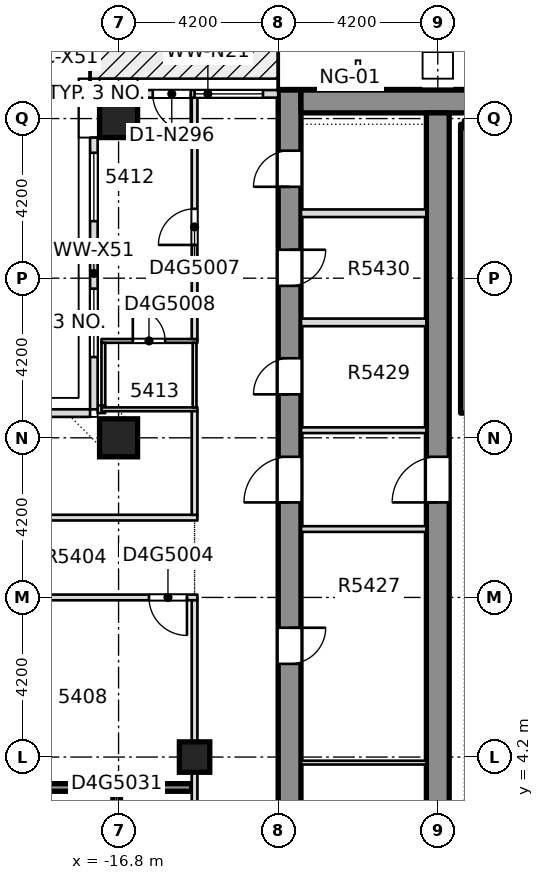
"""IFC4 building model, lengths in metres.
Left out: names, types, materials, properties, quantities, classifications, styles, units other than length and angle.
Written with IfcOpenShell. Run it as: python <this file> out.ifc"""

import sys

from ifc_helpers import new_model, si_unit, direction, frame, frame_2d, origin, origin_2d, place, context, subcontext, project, spatial, rectangle, extrude, element, fill, save


model = new_model("IFC4")
c1 = context("Model", 3, precision=1e-05, world=origin(), true_north=direction((0.0, 1.0)))
c2 = subcontext(c1, "Body", "Model", "MODEL_VIEW")
j1 = project(units=[si_unit("LENGTHUNIT", "METRE"), si_unit("PLANEANGLEUNIT", "RADIAN")], contexts=[c1])
p1 = place(None, origin())
s1 = spatial("IfcSite", under=j1, at=p1, CompositionType="ELEMENT")
p2 = place(p1, origin())
s2 = spatial("IfcBuilding", under=s1, at=p2, CompositionType="ELEMENT")
p3 = place(p2, frame((0.0, 0.0, 206.6)))
s3 = spatial("IfcBuildingStorey", under=s2, at=p3, CompositionType="ELEMENT", Elevation=206.6)
p4 = place(p3, frame((-12.3, -8.4, -0.4), z_axis=(0.0, 0.0, 1.0), x_axis=(0.0, 1.0, 0.0)))
e1 = element("IfcWall", 1, at=p4, inside=s3, PredefinedType="SHEAR", context=c2, shape_type="SweptSolid", body=[
    extrude(rectangle(XDim=30.15, YDim=0.6, at=frame_2d((15.075, 0.0))), origin(), (0.0, 0.0, 1.0), 3.45),
])
p5 = place(p4, frame((4.113, 0.0, 0.4)))
e2 = element("IfcOpeningElement", 2, at=p5, cuts=e1, PredefinedType="OPENING", context=c2, shape_type="SweptSolid", body=[
    extrude(rectangle(XDim=0.95, YDim=2.1, at=frame_2d((0.475, 1.05))), frame((0.0, 0.31, 0.0), z_axis=(0.0, -1.0, 0.0), x_axis=(1.0, 0.0, 0.0)), (0.0, 0.0, 1.0), 0.62),
])
p6 = place(p4, frame((9.89, 0.0, 0.4)))
e3 = element("IfcOpeningElement", 3, at=p6, cuts=e1, PredefinedType="OPENING", context=c2, shape_type="SweptSolid", body=[
    extrude(rectangle(XDim=0.95, YDim=2.1, at=frame_2d((0.475, 1.05))), frame((0.0, 0.31, 0.0), z_axis=(0.0, -1.0, 0.0), x_axis=(1.0, 0.0, 0.0)), (0.0, 0.0, 1.0), 0.62),
])
p7 = place(p4, frame((15.052, 0.0, 0.4)))
e4 = element("IfcOpeningElement", 4, at=p7, cuts=e1, PredefinedType="OPENING", context=c2, shape_type="SweptSolid", body=[
    extrude(rectangle(XDim=0.95, YDim=2.1, at=frame_2d((0.475, 1.05))), frame((0.0, 0.31, 0.0), z_axis=(0.0, -1.0, 0.0), x_axis=(1.0, 0.0, 0.0)), (0.0, 0.0, 1.0), 0.62),
])
p8 = place(p4, frame((22.144, 0.0, 0.4)))
e5 = element("IfcOpeningElement", 5, at=p8, cuts=e1, PredefinedType="OPENING", context=c2, shape_type="SweptSolid", body=[
    extrude(rectangle(XDim=0.95, YDim=2.1, at=frame_2d((0.475, 1.05))), frame((0.0, 0.31, 0.0), z_axis=(0.0, -1.0, 0.0), x_axis=(1.0, 0.0, 0.0)), (0.0, 0.0, 1.0), 0.62),
])
p9 = place(p4, frame((24.998, 0.0, 0.4)))
e6 = element("IfcOpeningElement", 6, at=p9, cuts=e1, PredefinedType="OPENING", context=c2, shape_type="SweptSolid", body=[
    extrude(rectangle(XDim=0.95, YDim=2.1, at=frame_2d((0.475, 1.05))), frame((0.0, 0.31, 0.0), z_axis=(0.0, -1.0, 0.0), x_axis=(1.0, 0.0, 0.0)), (0.0, 0.0, 1.0), 0.62),
])
p10 = place(p4, frame((27.605, 0.0, 0.4)))
e7 = element("IfcOpeningElement", 7, at=p10, cuts=e1, PredefinedType="OPENING", context=c2, shape_type="SweptSolid", body=[
    extrude(rectangle(XDim=0.95, YDim=2.1, at=frame_2d((0.475, 1.05))), frame((0.0, 0.31, 0.0), z_axis=(0.0, -1.0, 0.0), x_axis=(1.0, 0.0, 0.0)), (0.0, 0.0, 1.0), 0.62),
])
p11 = place(p4, frame((19.3, 0.0, 0.4)))
e8 = element("IfcOpeningElement", 8, at=p11, cuts=e1, PredefinedType="OPENING", context=c2, shape_type="SweptSolid", body=[
    extrude(rectangle(XDim=1.2, YDim=2.1, at=frame_2d((0.6, 1.05))), frame((0.0, 0.31, 0.0), z_axis=(0.0, -1.0, 0.0), x_axis=(1.0, 0.0, 0.0)), (0.0, 0.0, 1.0), 0.62),
])
p12 = place(p3, frame((-12.0, 21.45, -0.4), z_axis=(0.0, 0.0, 1.0), x_axis=(1.0, 0.0, 0.0)))
e9 = element("IfcWall", 9, at=p12, inside=s3, PredefinedType="SHEAR", context=c2, shape_type="SweptSolid", body=[
    extrude(rectangle(XDim=24.0, YDim=0.6, at=frame_2d((12.0, 0.0))), origin(), (0.0, 0.0, 1.0), 3.45),
])
p13 = place(p3, frame((-8.4, -7.8, -0.4), z_axis=(0.0, 0.0, 1.0), x_axis=(0.0, 1.0, 0.0)))
e10 = element("IfcWall", 10, at=p13, inside=s3, PredefinedType="SHEAR", context=c2, shape_type="SweptSolid", body=[
    extrude(rectangle(XDim=28.95, YDim=0.6, at=frame_2d((14.475, 0.0))), origin(), (0.0, 0.0, 1.0), 3.45),
])
p14 = place(p13, frame((18.7, 0.0, 0.4)))
e11 = element("IfcOpeningElement", 11, at=p14, cuts=e10, PredefinedType="OPENING", context=c2, shape_type="SweptSolid", body=[
    extrude(rectangle(XDim=1.2, YDim=2.1, at=frame_2d((0.6, 1.05))), frame((0.0, 0.31, 0.0), z_axis=(0.0, -1.0, 0.0), x_axis=(1.0, 0.0, 0.0)), (0.0, 0.0, 1.0), 0.62),
])
for number, where, z_axis, x_axis in (
    (12, (-16.8, 12.6, -0.4), (0.0, 0.0, 1.0), (1.0, 0.0, 0.0)),
    (13, (-16.8, 21.0, -0.4), (0.0, 0.0, 1.0), (1.0, 0.0, 0.0)),
):
    element("IfcColumn", number, at=place(p3, frame(where, z_axis=z_axis, x_axis=x_axis)), inside=s3, PredefinedType="COLUMN", context=c2, shape_type="SweptSolid", body=[
        extrude(rectangle(XDim=1.0, YDim=1.0, at=origin_2d()), origin(), (0.0, 0.0, 1.0), 3.45),
    ])
p15 = place(p3, frame((-14.8, 4.2, -0.4), z_axis=(0.0, 0.0, 1.0), x_axis=(1.0, 0.0, 0.0)))
e14 = element("IfcColumn", 14, at=p15, inside=s3, PredefinedType="COLUMN", context=c2, shape_type="SweptSolid", body=[
    extrude(rectangle(XDim=0.8, YDim=0.8, at=origin_2d()), origin(), (0.0, 0.0, 1.0), 3.45),
])
p16 = place(p3, frame((-20.45, 3.4, 0.0), z_axis=(0.0, 0.0, 1.0), x_axis=(1.0, 0.0, 0.0)))
e15 = element("IfcWall", 15, at=p16, inside=s3, PredefinedType="SOLIDWALL", context=c2, shape_type="SweptSolid", body=[
    extrude(rectangle(XDim=5.575, YDim=0.2, at=frame_2d((2.788, 0.0))), origin(), (0.0, 0.0, 1.0), 3.05),
])
p17 = place(p3, frame((-25.75, 8.4, 0.0), z_axis=(0.0, 0.0, 1.0), x_axis=(1.0, 0.0, 0.0)))
e16 = element("IfcWall", 16, at=p17, inside=s3, PredefinedType="PARTITIONING", context=c2, shape_type="SweptSolid", body=[
    extrude(rectangle(XDim=11.025, YDim=0.15, at=frame_2d((5.512, 0.0))), origin(), (0.0, 0.0, 1.0), 3.05),
])
p18 = place(p17, frame((9.75, 0.0, 0.0)))
e17 = element("IfcOpeningElement", 17, at=p18, cuts=e16, PredefinedType="OPENING", context=c2, shape_type="SweptSolid", body=[
    extrude(rectangle(XDim=1.0, YDim=2.1, at=frame_2d((0.5, 1.05))), frame((0.0, 0.085, 0.0), z_axis=(0.0, -1.0, 0.0), x_axis=(1.0, 0.0, 0.0)), (0.0, 0.0, 1.0), 0.17),
])
p19 = place(p3, frame((-25.75, 10.5, 0.0), z_axis=(0.0, 0.0, 1.0), x_axis=(1.0, 0.0, 0.0)))
e18 = element("IfcWall", 18, at=p19, inside=s3, PredefinedType="PARTITIONING", context=c2, shape_type="SweptSolid", body=[
    extrude(rectangle(XDim=11.025, YDim=0.15, at=frame_2d((5.512, 0.0))), origin(), (0.0, 0.0, 1.0), 3.05),
])
p20 = place(p19, frame((4.875, 0.0, 0.0)))
e19 = element("IfcOpeningElement", 19, at=p20, cuts=e18, PredefinedType="OPENING", context=c2, shape_type="SweptSolid", body=[
    extrude(rectangle(XDim=1.0, YDim=2.1, at=frame_2d((0.5, 1.05))), frame((0.0, 0.085, 0.0), z_axis=(0.0, -1.0, 0.0), x_axis=(1.0, 0.0, 0.0)), (0.0, 0.0, 1.0), 0.17),
])
p21 = place(p3, frame((-17.35, 13.35, 0.0), z_axis=(0.0, 0.0, 1.0), x_axis=(1.0, 0.0, 0.0)))
e20 = element("IfcWall", 20, at=p21, inside=s3, PredefinedType="PARTITIONING", context=c2, shape_type="SweptSolid", body=[
    extrude(rectangle(XDim=0.2, YDim=0.2, at=frame_2d((0.1, 0.0))), origin(), (0.0, 0.0, 1.0), 3.05),
])
p22 = place(p3, frame((-17.25, 13.35, 0.0), z_axis=(0.0, 0.0, 1.0), x_axis=(1.0, 0.0, 0.0)))
e21 = element("IfcWall", 21, at=p22, inside=s3, PredefinedType="PARTITIONING", context=c2, shape_type="SweptSolid", body=[
    extrude(rectangle(XDim=2.525, YDim=0.1, at=frame_2d((1.262, 0.0))), origin(), (0.0, 0.0, 1.0), 3.05),
])
p23 = place(p3, frame((-17.25, 15.15, 0.0), z_axis=(0.0, 0.0, 1.0), x_axis=(1.0, 0.0, 0.0)))
e22 = element("IfcWall", 22, at=p23, inside=s3, PredefinedType="PARTITIONING", context=c2, shape_type="SweptSolid", body=[
    extrude(rectangle(XDim=2.525, YDim=0.1, at=frame_2d((1.262, 0.0))), origin(), (0.0, 0.0, 1.0), 3.05),
])
p24 = place(p23, frame((0.825, 0.0, 0.0)))
e23 = element("IfcOpeningElement", 23, at=p24, cuts=e22, PredefinedType="OPENING", context=c2, shape_type="SweptSolid", body=[
    extrude(rectangle(XDim=0.85, YDim=2.1, at=frame_2d((0.425, 1.05))), frame((0.0, 0.06, 0.0), z_axis=(0.0, -1.0, 0.0), x_axis=(1.0, 0.0, 0.0)), (0.0, 0.0, 1.0), 0.12),
])
p25 = place(p3, frame((-17.2, 13.45, 0.0), z_axis=(0.0, 0.0, 1.0), x_axis=(0.0, 1.0, 0.0)))
e24 = element("IfcWall", 24, at=p25, inside=s3, PredefinedType="PARTITIONING", context=c2, shape_type="SweptSolid", body=[
    extrude(rectangle(XDim=1.65, YDim=0.1, at=frame_2d((0.825, 0.0))), origin(), (0.0, 0.0, 1.0), 3.05),
])
p26 = place(p3, frame((-16.85, -3.3, 0.0), z_axis=(0.0, 0.0, 1.0), x_axis=(0.0, 1.0, 0.0)))
e25 = element("IfcWall", 25, at=p26, inside=s3, PredefinedType="SOLIDWALL", context=c2, shape_type="SweptSolid", body=[
    extrude(rectangle(XDim=6.6, YDim=0.2, at=frame_2d((3.3, 0.0))), origin(), (0.0, 0.0, 1.0), 3.05),
])
p27 = place(p26, frame((5.1, 0.0, 0.0)))
e26 = element("IfcOpeningElement", 26, at=p27, cuts=e25, PredefinedType="OPENING", context=c2, shape_type="SweptSolid", body=[
    extrude(rectangle(XDim=1.2, YDim=2.1, at=frame_2d((0.6, 1.05))), frame((0.0, 0.11, 0.0), z_axis=(0.0, -1.0, 0.0), x_axis=(1.0, 0.0, 0.0)), (0.0, 0.0, 1.0), 0.22),
])
p28 = place(p3, frame((-14.8, -9.77, 0.0), z_axis=(0.0, 0.0, 1.0), x_axis=(0.0, 1.0, 0.0)))
e27 = element("IfcWall", 27, at=p28, inside=s3, PredefinedType="PARTITIONING", context=c2, shape_type="SweptSolid", body=[
    extrude(rectangle(XDim=18.095, YDim=0.15, at=frame_2d((9.047, 0.0))), origin(), (0.0, 0.0, 1.0), 3.05),
])
p29 = place(p28, frame((0.22, 0.0, 0.0)))
e28 = element("IfcOpeningElement", 28, at=p29, cuts=e27, PredefinedType="OPENING", context=c2, shape_type="SweptSolid", body=[
    extrude(rectangle(XDim=0.95, YDim=2.1, at=frame_2d((0.475, 1.05))), frame((0.0, 0.085, 0.0), z_axis=(0.0, -1.0, 0.0), x_axis=(1.0, 0.0, 0.0)), (0.0, 0.0, 1.0), 0.17),
])
p30 = place(p28, frame((9.22, 0.0, 0.0)))
e29 = element("IfcOpeningElement", 29, at=p30, cuts=e27, PredefinedType="OPENING", context=c2, shape_type="SweptSolid", body=[
    extrude(rectangle(XDim=1.1, YDim=2.1, at=frame_2d((0.55, 1.05))), frame((0.0, 0.085, 0.0), z_axis=(0.0, -1.0, 0.0), x_axis=(1.0, 0.0, 0.0)), (0.0, 0.0, 1.0), 0.17),
])
p31 = place(p28, frame((4.07, 0.0, 0.0)))
e30 = element("IfcOpeningElement", 30, at=p31, cuts=e27, PredefinedType="OPENING", context=c2, shape_type="SweptSolid", body=[
    extrude(rectangle(XDim=1.0, YDim=2.1, at=frame_2d((0.5, 1.05))), frame((0.0, 0.085, 0.0), z_axis=(0.0, -1.0, 0.0), x_axis=(1.0, 0.0, 0.0)), (0.0, 0.0, 1.0), 0.17),
])
p32 = place(p3, frame((-14.8, 10.575, 0.0), z_axis=(0.0, 0.0, 1.0), x_axis=(0.0, 1.0, 0.0)))
e31 = element("IfcWall", 31, at=p32, inside=s3, PredefinedType="PARTITIONING", context=c2, shape_type="SweptSolid", body=[
    extrude(rectangle(XDim=2.725, YDim=0.15, at=frame_2d((1.363, 0.0))), origin(), (0.0, 0.0, 1.0), 3.05),
])
p33 = place(p3, frame((-14.8, 13.4, 0.0), z_axis=(0.0, 0.0, 1.0), x_axis=(0.0, 1.0, 0.0)))
e32 = element("IfcWall", 32, at=p33, inside=s3, PredefinedType="PARTITIONING", context=c2, shape_type="SweptSolid", body=[
    extrude(rectangle(XDim=1.7, YDim=0.1, at=frame_2d((0.85, 0.0))), origin(), (0.0, 0.0, 1.0), 3.05),
])
p34 = place(p3, frame((-14.8, 15.2, 0.0), z_axis=(0.0, 0.0, 1.0), x_axis=(0.0, 1.0, 0.0)))
e33 = element("IfcWall", 33, at=p34, inside=s3, PredefinedType="PARTITIONING", context=c2, shape_type="SweptSolid", body=[
    extrude(rectangle(XDim=6.35, YDim=0.15, at=frame_2d((3.175, 0.0))), origin(), (0.0, 0.0, 1.0), 3.05),
])
p35 = place(p34, frame((2.475, 0.0, 0.0)))
e34 = element("IfcOpeningElement", 34, at=p35, cuts=e33, PredefinedType="OPENING", context=c2, shape_type="SweptSolid", body=[
    extrude(rectangle(XDim=0.95, YDim=2.1, at=frame_2d((0.475, 1.05))), frame((0.0, 0.085, 0.0), z_axis=(0.0, -1.0, 0.0), x_axis=(1.0, 0.0, 0.0)), (0.0, 0.0, 1.0), 0.17),
])
p36 = place(p3, frame((-12.6, 21.65, 0.0), z_axis=(0.0, 0.0, 1.0), x_axis=(-1.0, 0.0, 0.0)))
e35 = element("IfcWall", 35, at=p36, inside=s3, PredefinedType="STANDARD", context=c2, shape_type="SweptSolid", body=[
    extrude(rectangle(XDim=3.7, YDim=0.2, at=frame_2d((1.85, 0.0))), origin(), (0.0, 0.0, 1.0), 3.05),
])
p37 = place(p36, frame((0.4, 0.0, 0.2)))
e36 = element("IfcOpeningElement", 36, at=p37, cuts=e35, PredefinedType="OPENING", context=c2, shape_type="SweptSolid", body=[
    extrude(rectangle(XDim=1.8, YDim=2.65, at=frame_2d((0.9, 1.325))), frame((0.0, 0.11, 0.0), z_axis=(0.0, -1.0, 0.0), x_axis=(1.0, 0.0, 0.0)), (0.0, 0.0, 1.0), 0.22),
])
p38 = place(p36, frame((2.3, 0.0, 0.0)))
e37 = element("IfcOpeningElement", 37, at=p38, cuts=e35, PredefinedType="OPENING", context=c2, shape_type="SweptSolid", body=[
    extrude(rectangle(XDim=1.0, YDim=2.4, at=frame_2d((0.5, 1.2))), frame((0.0, 0.11, 0.0), z_axis=(0.0, -1.0, 0.0), x_axis=(1.0, 0.0, 0.0)), (0.0, 0.0, 1.0), 0.22),
])
p39 = place(p3, frame((-17.45, 20.5, 0.0), z_axis=(0.0, 0.0, 1.0), x_axis=(0.0, -1.0, 0.0)))
e38 = element("IfcWall", 38, at=p39, inside=s3, PredefinedType="STANDARD", context=c2, shape_type="SweptSolid", body=[
    extrude(rectangle(XDim=7.15, YDim=0.2, at=frame_2d((3.575, 0.0))), origin(), (0.0, 0.0, 1.0), 3.05),
])
p40 = place(p39, frame((3.975, 0.0, 0.2)))
e39 = element("IfcOpeningElement", 39, at=p40, cuts=e38, PredefinedType="OPENING", context=c2, shape_type="SweptSolid", body=[
    extrude(rectangle(XDim=1.8, YDim=2.65, at=frame_2d((0.9, 1.325))), frame((0.0, 0.11, 0.0), z_axis=(0.0, -1.0, 0.0), x_axis=(1.0, 0.0, 0.0)), (0.0, 0.0, 1.0), 0.22),
])
p41 = place(p39, frame((0.4, 0.0, 0.2)))
e40 = element("IfcOpeningElement", 40, at=p41, cuts=e38, PredefinedType="OPENING", context=c2, shape_type="SweptSolid", body=[
    extrude(rectangle(XDim=1.8, YDim=2.65, at=frame_2d((0.9, 1.325))), frame((0.0, 0.11, 0.0), z_axis=(0.0, -1.0, 0.0), x_axis=(1.0, 0.0, 0.0)), (0.0, 0.0, 1.0), 0.22),
])
p42 = place(p3, frame((-17.55, 13.25, 0.0), z_axis=(0.0, 0.0, 1.0), x_axis=(-1.0, 0.0, 0.0)))
e41 = element("IfcWall", 41, at=p42, inside=s3, PredefinedType="STANDARD", context=c2, shape_type="SweptSolid", body=[
    extrude(rectangle(XDim=7.15, YDim=0.2, at=frame_2d((3.575, 0.0))), origin(), (0.0, 0.0, 1.0), 3.05),
])
p43 = place(p3, frame((-11.999, 4.054, 0.0), z_axis=(0.0, 0.0, 1.0), x_axis=(1.0, 0.0, 0.0)))
e42 = element("IfcWall", 42, at=p43, inside=s3, PredefinedType="PARTITIONING", context=c2, shape_type="SweptSolid", body=[
    extrude(rectangle(XDim=3.298, YDim=0.1, at=frame_2d((1.649, 0.0))), origin(), (0.0, 0.0, 1.0), 3.05),
])
for number, where, z_axis, x_axis in (
    (43, (-11.999, 10.2, 0.0), (0.0, 0.0, 1.0), (1.0, 0.0, 0.0)),
    (44, (-11.999, 12.8, 0.0), (0.0, 0.0, 1.0), (1.0, 0.0, 0.0)),
):
    element("IfcWall", number, at=place(p3, frame(where, z_axis=z_axis, x_axis=x_axis)), inside=s3, PredefinedType="PARTITIONING", context=c2, shape_type="SweptSolid", body=[
        extrude(rectangle(XDim=3.298, YDim=0.15, at=frame_2d((1.649, 0.0))), origin(), (0.0, 0.0, 1.0), 3.05),
    ])
for number, where, z_axis, x_axis in (
    (45, (-11.999, 15.637, 0.0), (0.0, 0.0, 1.0), (1.0, 0.0, 0.0)),
    (46, (-11.999, 18.509, 0.0), (0.0, 0.0, 1.0), (1.0, 0.0, 0.0)),
):
    element("IfcWall", number, at=place(p3, frame(where, z_axis=z_axis, x_axis=x_axis)), inside=s3, PredefinedType="PARTITIONING", context=c2, shape_type="SweptSolid", body=[
        extrude(rectangle(XDim=3.298, YDim=0.2, at=frame_2d((1.649, 0.0))), origin(), (0.0, 0.0, 1.0), 3.05),
    ])
p44 = place(p3, frame((-7.7, 13.25, 0.0), z_axis=(0.0, 0.0, 1.0), x_axis=(0.0, 1.0, 0.0)))
e47 = element("IfcWall", 47, at=p44, inside=s3, PredefinedType="SOLIDWALL", context=c2, shape_type="SweptSolid", body=[
    extrude(rectangle(XDim=7.6, YDim=0.2, at=frame_2d((3.8, 0.0))), origin(), (0.0, 0.0, 1.0), 3.05),
])
p45 = place(p3, frame((-7.7, 20.85, 0.0), z_axis=(0.0, 0.0, 1.0), x_axis=(1.0, 0.0, 0.0)))
e48 = element("IfcWall", 48, at=p45, inside=s3, PredefinedType="SOLIDWALL", context=c2, shape_type="SweptSolid", body=[
    extrude(rectangle(XDim=3.55, YDim=0.2, at=frame_2d((1.775, 0.0))), origin(), (0.0, 0.0, 1.0), 3.05),
])
p46 = place(p18, origin())
e49 = element("IfcDoor", 49, at=p46, inside=s3, OperationType="SINGLE_SWING_RIGHT", PredefinedType="DOOR", context=c2, shape_type="SweptSolid", body=[
    extrude(rectangle(XDim=1.0, YDim=2.1, at=frame_2d((0.5, 1.05))), frame((0.0, 0.025, 0.0), z_axis=(0.0, -1.0, 0.0), x_axis=(1.0, 0.0, 0.0)), (0.0, 0.0, 1.0), 0.05),
])
fill(e17, e49)
p47 = place(p35, origin())
e50 = element("IfcDoor", 50, at=p47, inside=s3, OperationType="SINGLE_SWING_RIGHT", PredefinedType="DOOR", context=c2, shape_type="SweptSolid", body=[
    extrude(rectangle(XDim=0.95, YDim=2.1, at=frame_2d((0.475, 1.05))), frame((0.0, 0.025, 0.0), z_axis=(0.0, -1.0, 0.0), x_axis=(1.0, 0.0, 0.0)), (0.0, 0.0, 1.0), 0.05),
])
fill(e34, e50)
p48 = place(p24, origin())
e51 = element("IfcDoor", 51, at=p48, inside=s3, OperationType="SINGLE_SWING_RIGHT", PredefinedType="DOOR", context=c2, shape_type="SweptSolid", body=[
    extrude(rectangle(XDim=0.85, YDim=2.1, at=frame_2d((0.425, 1.05))), frame((0.0, 0.025, 0.0), z_axis=(0.0, -1.0, 0.0), x_axis=(1.0, 0.0, 0.0)), (0.0, 0.0, 1.0), 0.05),
])
fill(e23, e51)
p49 = place(p37, origin())
e52 = element("IfcWindow", 52, at=p49, inside=s3, PartitioningType="SINGLE_PANEL", PredefinedType="WINDOW", context=c2, shape_type="SweptSolid", body=[
    extrude(rectangle(XDim=1.8, YDim=2.65, at=frame_2d((0.9, 1.325))), frame((0.0, 0.03, 0.0), z_axis=(0.0, -1.0, 0.0), x_axis=(1.0, 0.0, 0.0)), (0.0, 0.0, 1.0), 0.06),
])
fill(e36, e52)
p50 = place(p38, origin())
e53 = element("IfcDoor", 53, at=p50, inside=s3, OperationType="SINGLE_SWING_LEFT", PredefinedType="DOOR", context=c2, shape_type="SweptSolid", body=[
    extrude(rectangle(XDim=1.0, YDim=2.4, at=frame_2d((0.5, 1.2))), frame((0.0, 0.025, 0.0), z_axis=(0.0, -1.0, 0.0), x_axis=(1.0, 0.0, 0.0)), (0.0, 0.0, 1.0), 0.05),
])
fill(e37, e53)
p51 = place(p40, origin())
e54 = element("IfcWindow", 54, at=p51, inside=s3, PartitioningType="SINGLE_PANEL", PredefinedType="WINDOW", context=c2, shape_type="SweptSolid", body=[
    extrude(rectangle(XDim=1.8, YDim=2.65, at=frame_2d((0.9, 1.325))), frame((0.0, 0.03, 0.0), z_axis=(0.0, -1.0, 0.0), x_axis=(1.0, 0.0, 0.0)), (0.0, 0.0, 1.0), 0.06),
])
fill(e39, e54)
p52 = place(p41, origin())
e55 = element("IfcWindow", 55, at=p52, inside=s3, PartitioningType="SINGLE_PANEL", PredefinedType="WINDOW", context=c2, shape_type="SweptSolid", body=[
    extrude(rectangle(XDim=1.8, YDim=2.65, at=frame_2d((0.9, 1.325))), frame((0.0, 0.03, 0.0), z_axis=(0.0, -1.0, 0.0), x_axis=(1.0, 0.0, 0.0)), (0.0, 0.0, 1.0), 0.06),
])
fill(e40, e55)
p53 = place(p7, origin())
e56 = element("IfcDoor", 56, at=p53, inside=s3, OperationType="SINGLE_SWING_LEFT", PredefinedType="DOOR", context=c2, shape_type="SweptSolid", body=[
    extrude(rectangle(XDim=0.95, YDim=2.1, at=frame_2d((0.475, 1.05))), frame((0.0, 0.025, 0.0), z_axis=(0.0, -1.0, 0.0), x_axis=(1.0, 0.0, 0.0)), (0.0, 0.0, 1.0), 0.05),
])
fill(e4, e56)
p54 = place(p8, origin())
e57 = element("IfcDoor", 57, at=p54, inside=s3, OperationType="SINGLE_SWING_LEFT", PredefinedType="DOOR", context=c2, shape_type="SweptSolid", body=[
    extrude(rectangle(XDim=0.95, YDim=2.1, at=frame_2d((0.475, 1.05))), frame((0.0, 0.025, 0.0), z_axis=(0.0, -1.0, 0.0), x_axis=(1.0, 0.0, 0.0)), (0.0, 0.0, 1.0), 0.05),
])
fill(e5, e57)
p55 = place(p9, origin())
e58 = element("IfcDoor", 58, at=p55, inside=s3, OperationType="SINGLE_SWING_LEFT", PredefinedType="DOOR", context=c2, shape_type="SweptSolid", body=[
    extrude(rectangle(XDim=0.95, YDim=2.1, at=frame_2d((0.475, 1.05))), frame((0.0, 0.025, 0.0), z_axis=(0.0, -1.0, 0.0), x_axis=(1.0, 0.0, 0.0)), (0.0, 0.0, 1.0), 0.05),
])
fill(e6, e58)
p56 = place(p10, origin())
e59 = element("IfcDoor", 59, at=p56, inside=s3, OperationType="SINGLE_SWING_LEFT", PredefinedType="DOOR", context=c2, shape_type="SweptSolid", body=[
    extrude(rectangle(XDim=0.95, YDim=2.1, at=frame_2d((0.475, 1.05))), frame((0.0, 0.025, 0.0), z_axis=(0.0, -1.0, 0.0), x_axis=(1.0, 0.0, 0.0)), (0.0, 0.0, 1.0), 0.05),
])
fill(e7, e59)
p57 = place(p11, origin())
e60 = element("IfcDoor", 60, at=p57, inside=s3, OperationType="SINGLE_SWING_LEFT", PredefinedType="DOOR", context=c2, shape_type="SweptSolid", body=[
    extrude(rectangle(XDim=1.2, YDim=2.1, at=frame_2d((0.6, 1.05))), frame((0.0, 0.025, 0.0), z_axis=(0.0, -1.0, 0.0), x_axis=(1.0, 0.0, 0.0)), (0.0, 0.0, 1.0), 0.05),
])
fill(e8, e60)
p58 = place(p14, origin())
e61 = element("IfcDoor", 61, at=p58, inside=s3, OperationType="SINGLE_SWING_LEFT", PredefinedType="DOOR", context=c2, shape_type="SweptSolid", body=[
    extrude(rectangle(XDim=1.2, YDim=2.1, at=frame_2d((0.6, 1.05))), frame((0.0, 0.025, 0.0), z_axis=(0.0, -1.0, 0.0), x_axis=(1.0, 0.0, 0.0)), (0.0, 0.0, 1.0), 0.05),
])
fill(e11, e61)
save(model, sys.argv[1])
